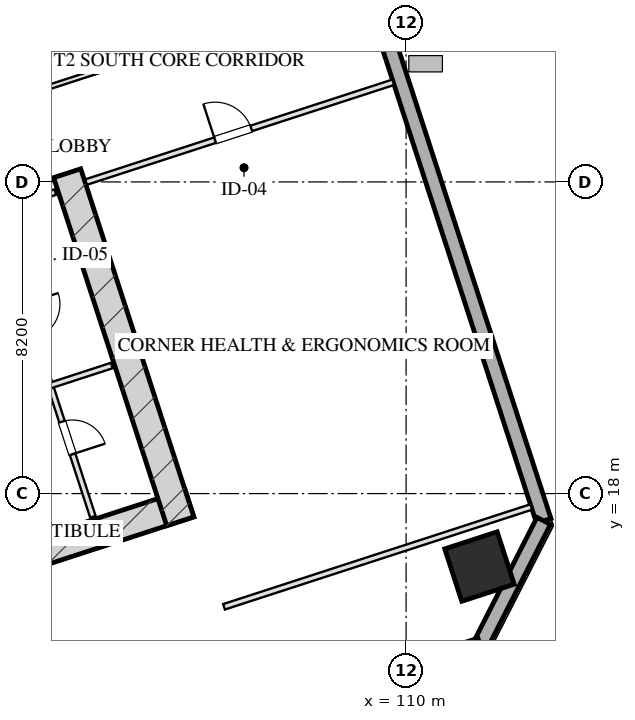
"""IFC4 building model, lengths in metres.
Left out: names, types, materials, properties, quantities, classifications, styles, units other than length and angle.
Written with IfcOpenShell. Run it as: python <this file> out.ifc"""

import sys

from ifc_helpers import new_model, si_unit, direction, frame, frame_2d, origin, origin_2d, place, context, subcontext, project, spatial, rectangle, hollow_rectangle, extrude, element, fill, save


model = new_model("IFC4")
c1 = context("Model", 3, precision=1e-05, world=origin(), true_north=direction((0.0, 1.0)))
c2 = subcontext(c1, "Body", "Model", "MODEL_VIEW")
j1 = project(units=[si_unit("LENGTHUNIT", "METRE"), si_unit("PLANEANGLEUNIT", "RADIAN")], contexts=[c1])
p1 = place(None, origin())
s1 = spatial("IfcSite", under=j1, at=p1, CompositionType="ELEMENT")
p2 = place(p1, origin())
s2 = spatial("IfcBuilding", under=s1, at=p2, CompositionType="ELEMENT")
p3 = place(p2, frame((0.0, 0.0, 88.55)))
s3 = spatial("IfcBuildingStorey", under=s2, at=p3, CompositionType="ELEMENT", Elevation=88.55)
p4 = place(p3, frame((88.559, 12.629, 0.0), z_axis=(0.0, 0.0, 1.0), x_axis=(0.951056072937, 0.309018358888, 0.0)))
e1 = element("IfcWall", 1, at=p4, inside=s3, PredefinedType="SHEAR", context=c2, shape_type="SweptSolid", body=[
    extrude(rectangle(XDim=16.55, YDim=0.75, at=frame_2d((8.275, 0.0))), origin(), (0.0, 0.0, 1.0), 3.45),
])
p5 = place(p3, frame((101.082, 26.429, 0.0), z_axis=(0.0, 0.0, 1.0), x_axis=(0.309016134813, -0.951056795583, 0.0)))
e2 = element("IfcWall", 2, at=p5, inside=s3, PredefinedType="SHEAR", context=c2, shape_type="SweptSolid", body=[
    extrude(rectangle(XDim=9.63, YDim=0.75, at=frame_2d((4.815, 0.0))), origin(), (0.0, 0.0, 1.0), 3.45),
])
p6 = place(p3, frame((111.931, 16.08, 0.0), z_axis=(0.0, 0.0, 1.0), x_axis=(0.951056516295, 0.309016994375, 0.0)))
e3 = element("IfcColumn", 3, at=p6, inside=s3, PredefinedType="COLUMN", context=c2, shape_type="SweptSolid", body=[
    extrude(hollow_rectangle(XDim=1.45, YDim=1.45, WallThickness=0.05, at=origin_2d()), origin(), (0.0, 0.0, 1.0), 3.451),
])
p7 = place(p3, frame((99.284, 61.41, 0.0), z_axis=(0.0, 0.0, 1.0), x_axis=(0.309017542002, -0.95105633836, 0.0)))
e4 = element("IfcWall", 4, at=p7, inside=s3, PredefinedType="SOLIDWALL", context=c2, shape_type="SweptSolid", body=[
    extrude(rectangle(XDim=46.4, YDim=0.4, at=frame_2d((23.2, 0.0))), origin(), (0.0, 0.0, 1.0), 2.55),
])
p8 = place(p7, frame((19.4, 0.0, 0.75)))
e5 = element("IfcOpeningElement", 5, at=p8, cuts=e4, PredefinedType="OPENING", context=c2, shape_type="SweptSolid", body=[
    extrude(rectangle(XDim=2.4, YDim=1.4, at=frame_2d((1.2, 0.7))), frame((0.0, 0.21, 0.0), z_axis=(0.0, -1.0, 0.0), x_axis=(1.0, 0.0, 0.0)), (0.0, 0.0, 1.0), 0.42),
])
p9 = place(p7, frame((15.6, 0.0, 0.75)))
e6 = element("IfcOpeningElement", 6, at=p9, cuts=e4, PredefinedType="OPENING", context=c2, shape_type="SweptSolid", body=[
    extrude(rectangle(XDim=2.4, YDim=1.4, at=frame_2d((1.2, 0.7))), frame((0.0, 0.21, 0.0), z_axis=(0.0, -1.0, 0.0), x_axis=(1.0, 0.0, 0.0)), (0.0, 0.0, 1.0), 0.42),
])
p10 = place(p7, frame((27.05, 0.0, 0.0)))
e7 = element("IfcOpeningElement", 7, at=p10, cuts=e4, PredefinedType="OPENING", context=c2, shape_type="SweptSolid", body=[
    extrude(rectangle(XDim=1.1, YDim=2.15, at=frame_2d((0.55, 1.075))), frame((0.0, 0.21, 0.0), z_axis=(0.0, -1.0, 0.0), x_axis=(1.0, 0.0, 0.0)), (0.0, 0.0, 1.0), 0.42),
])
p11 = place(p3, frame((113.623, 17.281, 0.0), z_axis=(0.0, 0.0, 1.0), x_axis=(-0.454026238093, -0.890988313685, 0.0)))
e8 = element("IfcWall", 8, at=p11, inside=s3, PredefinedType="SOLIDWALL", context=c2, shape_type="SweptSolid", body=[
    extrude(rectangle(XDim=3.677, YDim=0.4, at=frame_2d((1.838, 0.0))), origin(), (0.0, 0.0, 1.0), 2.55),
])
p12 = place(p3, frame((111.953, 14.005, 0.0), z_axis=(0.0, 0.0, 1.0), x_axis=(-0.95105505922, -0.309021478754, 0.0)))
e9 = element("IfcWall", 9, at=p12, inside=s3, PredefinedType="SOLIDWALL", context=c2, shape_type="SweptSolid", body=[
    extrude(rectangle(XDim=29.4, YDim=0.4, at=frame_2d((14.7, 0.0))), origin(), (0.0, 0.0, 1.0), 2.55),
])
p13 = place(p3, frame((97.727, 24.944, 0.0), z_axis=(0.0, 0.0, 1.0), x_axis=(0.951036872128, 0.309077446369, 0.0)))
e10 = element("IfcWall", 10, at=p13, inside=s3, PredefinedType="PARTITIONING", context=c2, shape_type="SweptSolid", body=[
    extrude(rectangle(XDim=3.2, YDim=0.15, at=frame_2d((1.6, 0.0))), origin(), (0.0, 0.0, 1.0), 3.155),
])
p14 = place(p13, frame((0.22, 0.0, 0.0)))
e11 = element("IfcOpeningElement", 11, at=p14, cuts=e10, PredefinedType="OPENING", context=c2, shape_type="SweptSolid", body=[
    extrude(rectangle(XDim=0.95, YDim=2.05, at=frame_2d((0.475, 1.025))), frame((0.0, 0.085, 0.0), z_axis=(0.0, -1.0, 0.0), x_axis=(1.0, 0.0, 0.0)), (0.0, 0.0, 1.0), 0.17),
])
p15 = place(p3, frame((99.153, 25.408, 0.0), z_axis=(0.0, 0.0, 1.0), x_axis=(0.309016001439, -0.951056838919, 0.0)))
e12 = element("IfcWall", 12, at=p15, inside=s3, PredefinedType="PARTITIONING", context=c2, shape_type="SweptSolid", body=[
    extrude(rectangle(XDim=8.43, YDim=0.15, at=frame_2d((4.215, 0.0))), origin(), (0.0, 0.0, 1.0), 3.155),
])
p16 = place(p15, frame((2.55, 0.0, 0.0)))
e13 = element("IfcOpeningElement", 13, at=p16, cuts=e12, PredefinedType="OPENING", context=c2, shape_type="SweptSolid", body=[
    extrude(rectangle(XDim=0.95, YDim=2.05, at=frame_2d((0.475, 1.025))), frame((0.0, 0.085, 0.0), z_axis=(0.0, -1.0, 0.0), x_axis=(1.0, 0.0, 0.0)), (0.0, 0.0, 1.0), 0.17),
])
p17 = place(p15, frame((5.8, 0.0, 0.0)))
e14 = element("IfcOpeningElement", 14, at=p17, cuts=e12, PredefinedType="OPENING", context=c2, shape_type="SweptSolid", body=[
    extrude(rectangle(XDim=0.9, YDim=2.05, at=frame_2d((0.45, 1.025))), frame((0.0, 0.085, 0.0), z_axis=(0.0, -1.0, 0.0), x_axis=(1.0, 0.0, 0.0)), (0.0, 0.0, 1.0), 0.17),
])
p18 = place(p3, frame((100.636, 20.843, 0.0), z_axis=(0.0, 0.0, 1.0), x_axis=(0.951040401051, 0.309066587596, 0.0)))
e15 = element("IfcWall", 15, at=p18, inside=s3, PredefinedType="PARTITIONING", context=c2, shape_type="SweptSolid", body=[
    extrude(rectangle(XDim=1.7, YDim=0.15, at=frame_2d((0.85, 0.0))), origin(), (0.0, 0.0, 1.0), 3.155),
])
p19 = place(p3, frame((105.209, 15.021, 0.0), z_axis=(0.0, 0.0, 1.0), x_axis=(0.951054329824, 0.309023723562, 0.0)))
e16 = element("IfcWall", 16, at=p19, inside=s3, PredefinedType="PARTITIONING", context=c2, shape_type="SweptSolid", body=[
    extrude(rectangle(XDim=8.5, YDim=0.15, at=frame_2d((4.25, 0.0))), origin(), (0.0, 0.0, 1.0), 3.155),
])
p20 = place(p3, frame((101.578, 26.196, 0.0), z_axis=(0.0, 0.0, 1.0), x_axis=(0.951062770994, 0.308997743729, 0.0)))
e17 = element("IfcWall", 17, at=p20, inside=s3, PredefinedType="PARTITIONING", context=c2, shape_type="SweptSolid", body=[
    extrude(rectangle(XDim=8.5, YDim=0.15, at=frame_2d((4.25, 0.0))), origin(), (0.0, 0.0, 1.0), 3.155),
])
p21 = place(p20, frame((3.57, 0.0, 0.0)))
e18 = element("IfcOpeningElement", 18, at=p21, cuts=e17, PredefinedType="OPENING", context=c2, shape_type="SweptSolid", body=[
    extrude(rectangle(XDim=1.0, YDim=2.05, at=frame_2d((0.5, 1.025))), frame((0.0, 0.085, 0.0), z_axis=(0.0, -1.0, 0.0), x_axis=(1.0, 0.0, 0.0)), (0.0, 0.0, 1.0), 0.17),
])
p22 = place(p3, frame((97.968, 27.841, 0.0), z_axis=(0.0, 0.0, 1.0), x_axis=(0.951055737546, 0.309019391108, 0.0)))
e19 = element("IfcWall", 19, at=p22, inside=s3, PredefinedType="PARTITIONING", context=c2, shape_type="SweptSolid", body=[
    extrude(rectangle(XDim=11.425, YDim=0.12, at=frame_2d((5.712, 0.0))), origin(), (0.0, 0.0, 1.0), 3.155),
])
p23 = place(p17, origin())
e20 = element("IfcDoor", 20, at=p23, inside=s3, OperationType="SINGLE_SWING_RIGHT", PredefinedType="DOOR", context=c2, shape_type="SweptSolid", body=[
    extrude(rectangle(XDim=0.9, YDim=2.05, at=frame_2d((0.45, 1.025))), frame((0.0, 0.025, 0.0), z_axis=(0.0, -1.0, 0.0), x_axis=(1.0, 0.0, 0.0)), (0.0, 0.0, 1.0), 0.05),
])
fill(e14, e20)
p24 = place(p21, origin())
e21 = element("IfcDoor", 21, at=p24, inside=s3, OperationType="SINGLE_SWING_LEFT", PredefinedType="DOOR", context=c2, shape_type="SweptSolid", body=[
    extrude(rectangle(XDim=1.0, YDim=2.05, at=frame_2d((0.5, 1.025))), frame((0.0, 0.025, 0.0), z_axis=(0.0, -1.0, 0.0), x_axis=(1.0, 0.0, 0.0)), (0.0, 0.0, 1.0), 0.05),
])
fill(e18, e21)
save(model, sys.argv[1])
